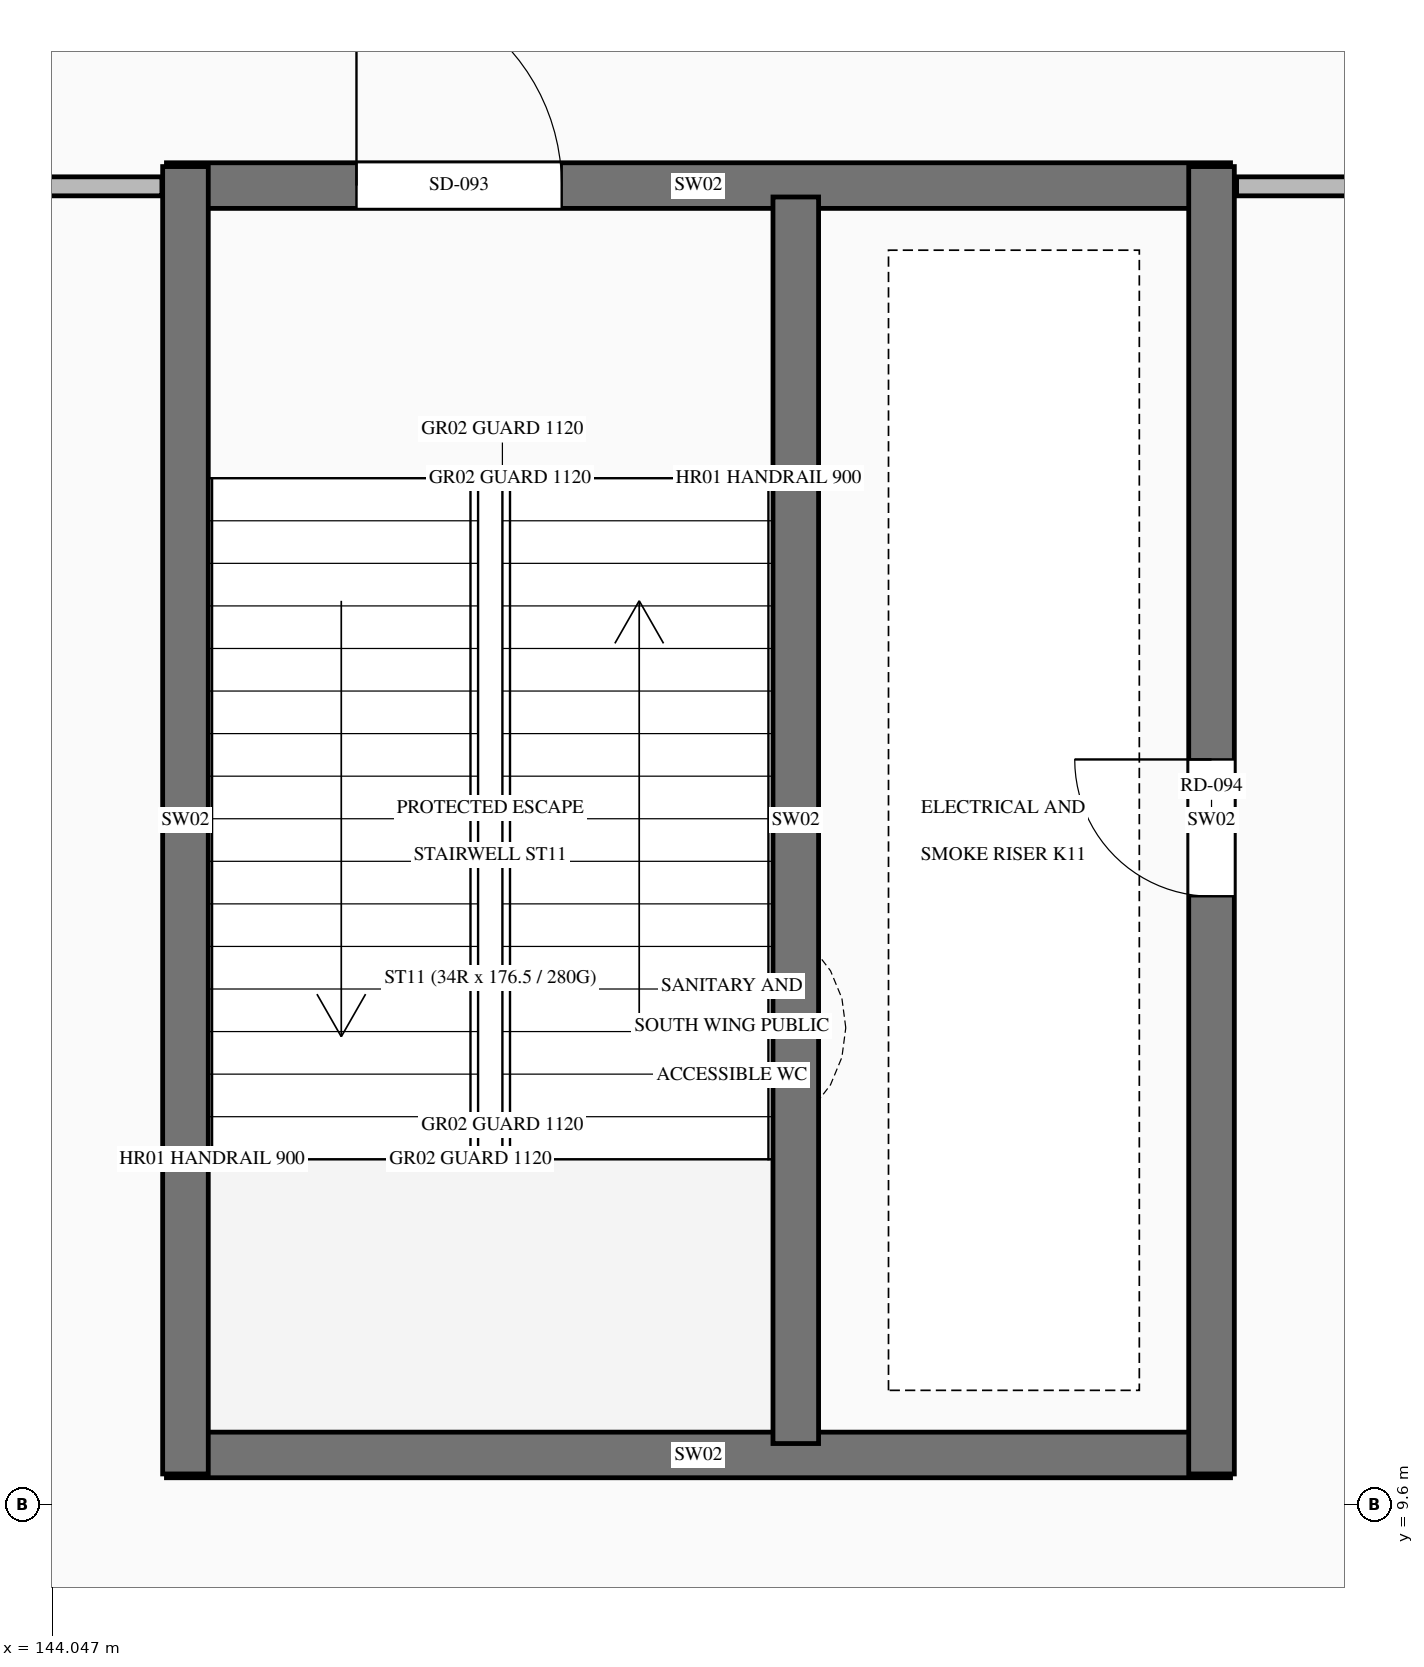
"""IFC4 building model, lengths in metres.
Left out: names, types, materials, properties, quantities, classifications, styles, units other than length and angle.
Written with IfcOpenShell. Run it as: python <this file> out.ifc"""

import sys

from ifc_helpers import new_model, si_unit, direction, frame, frame_2d, origin, origin_2d, place, context, subcontext, project, spatial, rectangle, i_section, extrude, element, fill, save


model = new_model("IFC4")
c1 = context("Model", 3, precision=1e-05, world=origin(), true_north=direction((0.0, 1.0)))
c2 = subcontext(c1, "Body", "Model", "MODEL_VIEW")
j1 = project(units=[si_unit("LENGTHUNIT", "METRE"), si_unit("PLANEANGLEUNIT", "RADIAN")], contexts=[c1])
p1 = place(None, origin())
s1 = spatial("IfcSite", under=j1, at=p1, CompositionType="ELEMENT")
p2 = place(p1, origin())
s2 = spatial("IfcBuilding", under=s1, at=p2, CompositionType="ELEMENT")
p3 = place(p2, origin())
s3 = spatial("IfcBuildingStorey", under=s2, at=p3, CompositionType="ELEMENT", Elevation=0.0)
for number, where, z_axis, x_axis in (
    (1, (144.0, 9.6, 0.0), (0.0, 0.0, 1.0), (1.0, 0.0, 0.0)),
    (2, (144.0, 19.2, 0.0), (0.0, 0.0, 1.0), (1.0, 0.0, 0.0)),
):
    element("IfcColumn", number, at=place(p3, frame(where, z_axis=z_axis, x_axis=x_axis)), inside=s3, PredefinedType="COLUMN", context=c2, shape_type="SweptSolid", body=[
        extrude(i_section(OverallWidth=0.3, OverallDepth=0.5, WebThickness=0.014, FlangeThickness=0.028, FilletRadius=0.027, at=origin_2d()), origin(), (0.0, 0.0, 1.0), 6.0),
    ])
p4 = place(p3, frame((144.8, 9.925, 0.0), z_axis=(0.0, 0.0, 1.0), x_axis=(1.0, 0.0, 0.0)))
e3 = element("IfcWall", 3, at=p4, inside=s3, PredefinedType="SHEAR", context=c2, shape_type="SweptSolid", body=[
    extrude(rectangle(XDim=7.0, YDim=0.3, at=frame_2d((3.5, 0.0))), origin(), (0.0, 0.0, 1.0), 6.0),
])
p5 = place(p3, frame((144.8, 18.275, 0.0), z_axis=(0.0, 0.0, 1.0), x_axis=(1.0, 0.0, 0.0)))
e4 = element("IfcWall", 4, at=p5, inside=s3, PredefinedType="SHEAR", context=c2, shape_type="SweptSolid", body=[
    extrude(rectangle(XDim=7.0, YDim=0.3, at=frame_2d((3.5, 0.0))), origin(), (0.0, 0.0, 1.0), 6.0),
])
p6 = place(p5, frame((1.25, 0.0, 0.0)))
e5 = element("IfcOpeningElement", 5, at=p6, cuts=e4, PredefinedType="OPENING", context=c2, shape_type="SweptSolid", body=[
    extrude(rectangle(XDim=1.35, YDim=2.2, at=frame_2d((0.675, 1.1))), frame((0.0, 0.165, 0.0), z_axis=(0.0, -1.0, 0.0), x_axis=(1.0, 0.0, 0.0)), (0.0, 0.0, 1.0), 0.33),
])
p7 = place(p3, frame((144.925, 9.8, 0.0), z_axis=(0.0, 0.0, 1.0), x_axis=(0.0, 1.0, 0.0)))
e6 = element("IfcWall", 6, at=p7, inside=s3, PredefinedType="SHEAR", context=c2, shape_type="SweptSolid", body=[
    extrude(rectangle(XDim=8.6, YDim=0.3, at=frame_2d((4.3, 0.0))), origin(), (0.0, 0.0, 1.0), 6.0),
])
p8 = place(p3, frame((151.675, 9.8, 0.0), z_axis=(0.0, 0.0, 1.0), x_axis=(0.0, 1.0, 0.0)))
e7 = element("IfcWall", 7, at=p8, inside=s3, PredefinedType="SHEAR", context=c2, shape_type="SweptSolid", body=[
    extrude(rectangle(XDim=8.6, YDim=0.3, at=frame_2d((4.3, 0.0))), origin(), (0.0, 0.0, 1.0), 6.0),
])
p9 = place(p8, frame((3.8, 0.0, 0.0)))
e8 = element("IfcOpeningElement", 8, at=p9, cuts=e7, PredefinedType="OPENING", context=c2, shape_type="SweptSolid", body=[
    extrude(rectangle(XDim=0.9, YDim=2.05, at=frame_2d((0.45, 1.025))), frame((0.0, 0.165, 0.0), z_axis=(0.0, -1.0, 0.0), x_axis=(1.0, 0.0, 0.0)), (0.0, 0.0, 1.0), 0.33),
])
p10 = place(p3, frame((148.94, 10.0, 0.0), z_axis=(0.0, 0.0, 1.0), x_axis=(0.0, 1.0, 0.0)))
e9 = element("IfcWall", 9, at=p10, inside=s3, PredefinedType="SHEAR", context=c2, shape_type="SweptSolid", body=[
    extrude(rectangle(XDim=8.2, YDim=0.3, at=frame_2d((4.1, 0.0))), origin(), (0.0, 0.0, 1.0), 6.0),
])
p11 = place(p3, frame((151.84, 18.27, 0.0), z_axis=(0.0, 0.0, 1.0), x_axis=(1.0, 0.0, 0.0)))
e10 = element("IfcWall", 10, at=p11, inside=s3, PredefinedType="PARTITIONING", context=c2, shape_type="SweptSolid", body=[
    extrude(rectangle(XDim=1.93, YDim=0.125, at=frame_2d((0.965, 0.0))), origin(), (0.0, 0.0, 1.0), 5.72),
])
p12 = place(p3, frame((142.84, 18.27, 0.0), z_axis=(0.0, 0.0, 1.0), x_axis=(1.0, 0.0, 0.0)))
e11 = element("IfcWall", 11, at=p12, inside=s3, PredefinedType="PARTITIONING", context=c2, shape_type="SweptSolid", body=[
    extrude(rectangle(XDim=1.93, YDim=0.125, at=frame_2d((0.965, 0.0))), origin(), (0.0, 0.0, 1.0), 5.72),
])
p13 = place(p12, frame((0.1, 0.0, 0.0)))
e12 = element("IfcOpeningElement", 12, at=p13, cuts=e11, PredefinedType="OPENING", context=c2, shape_type="SweptSolid", body=[
    extrude(rectangle(XDim=0.95, YDim=2.1, at=frame_2d((0.475, 1.05))), frame((0.0, 0.077, 0.0), z_axis=(0.0, -1.0, 0.0), x_axis=(1.0, 0.0, 0.0)), (0.0, 0.0, 1.0), 0.155),
])
p14 = place(p6, origin())
e13 = element("IfcDoor", 13, at=p14, inside=s3, OperationType="SINGLE_SWING_LEFT", PredefinedType="DOOR", context=c2, shape_type="SweptSolid", body=[
    extrude(rectangle(XDim=1.35, YDim=2.2, at=frame_2d((0.675, 1.1))), frame((0.0, 0.025, 0.0), z_axis=(0.0, -1.0, 0.0), x_axis=(1.0, 0.0, 0.0)), (0.0, 0.0, 1.0), 0.05),
])
fill(e5, e13)
p15 = place(p9, origin())
e14 = element("IfcDoor", 14, at=p15, inside=s3, OperationType="SINGLE_SWING_RIGHT", PredefinedType="DOOR", context=c2, shape_type="SweptSolid", body=[
    extrude(rectangle(XDim=0.9, YDim=2.05, at=frame_2d((0.45, 1.025))), frame((0.0, 0.025, 0.0), z_axis=(0.0, -1.0, 0.0), x_axis=(1.0, 0.0, 0.0)), (0.0, 0.0, 1.0), 0.05),
])
fill(e8, e14)
save(model, sys.argv[1])
